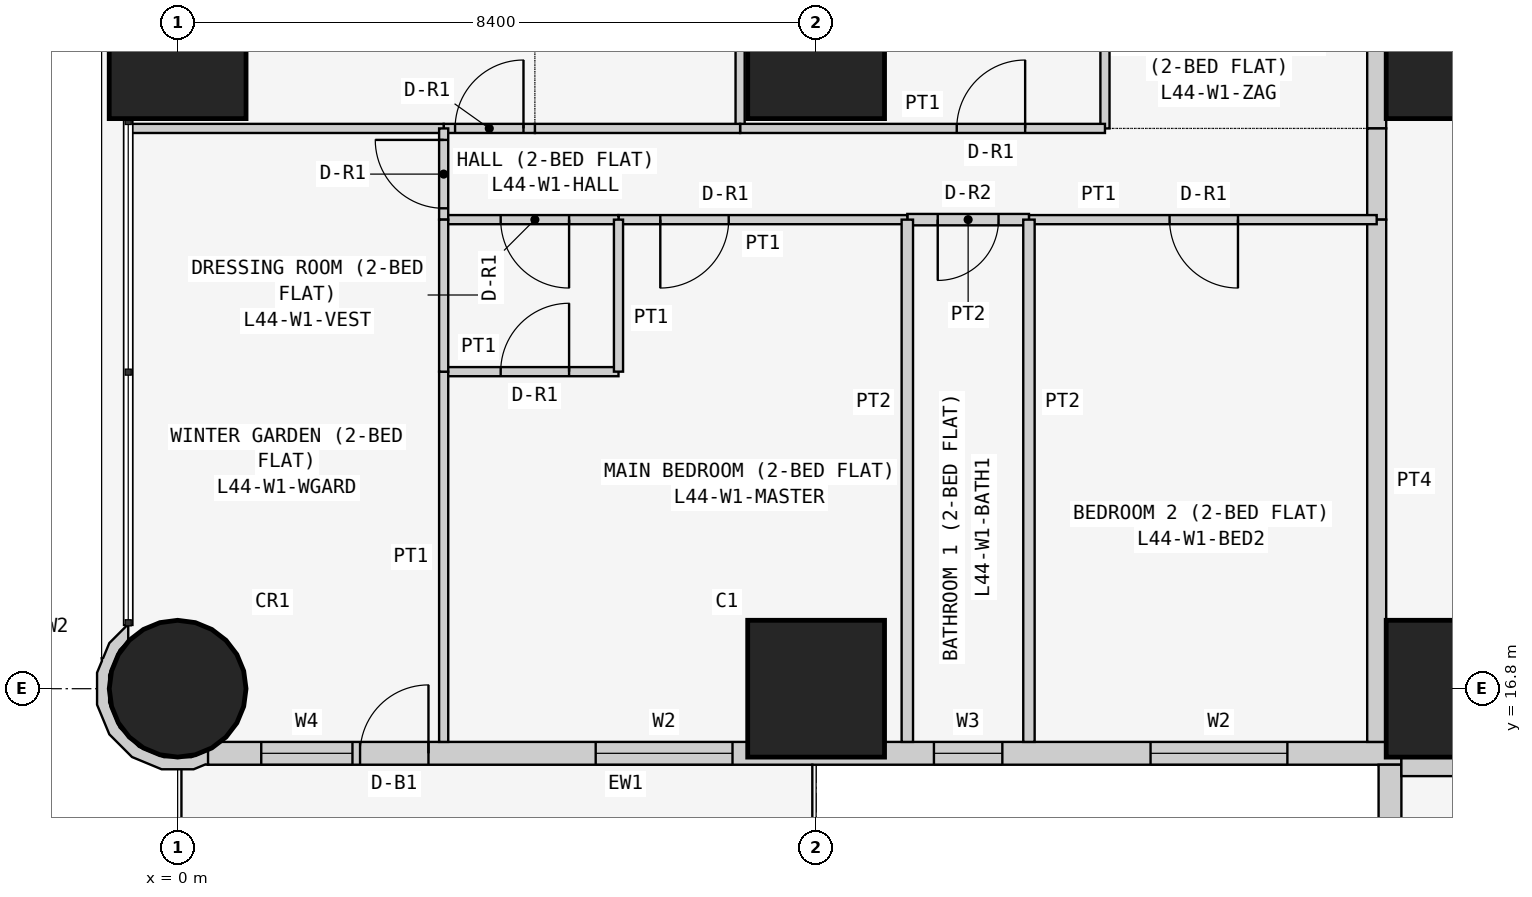
"""IFC4 building model, lengths in metres.
Left out: names, types, materials, properties, quantities, classifications, styles, units other than length and angle.
Written with IfcOpenShell. Run it as: python <this file> out.ifc"""

import sys

from ifc_helpers import new_model, si_unit, direction, frame, frame_2d, origin, origin_2d, place, context, subcontext, project, spatial, polyline, rectangle, circle, outline, extrude, element, fill, save


model = new_model("IFC4")
c1 = context("Model", 3, precision=1e-05, world=origin(), true_north=direction((0.0, 1.0)))
c2 = subcontext(c1, "Body", "Model", "MODEL_VIEW")
j1 = project(units=[si_unit("LENGTHUNIT", "METRE"), si_unit("PLANEANGLEUNIT", "RADIAN")], contexts=[c1])
p1 = place(None, origin())
s1 = spatial("IfcSite", under=j1, at=p1, CompositionType="ELEMENT")
p2 = place(p1, origin())
s2 = spatial("IfcBuilding", under=s1, at=p2, CompositionType="ELEMENT")
p3 = place(p2, frame((0.0, 0.0, 170.1)))
s3 = spatial("IfcBuildingStorey", under=s2, at=p3, CompositionType="ELEMENT", Elevation=170.1)
p4 = place(p3, frame((0.0, 16.8, 0.0), z_axis=(0.0, 0.0, 1.0), x_axis=(1.0, 0.0, 0.0)))
e1 = element("IfcColumn", 1, at=p4, inside=s3, PredefinedType="COLUMN", context=c2, shape_type="SweptSolid", body=[
    extrude(circle(Radius=0.9, at=origin_2d()), origin(), (0.0, 0.0, 1.0), 3.6),
])
for number, where, z_axis, x_axis in (
    (2, (0.0, 25.2, 0.0), (0.0, 0.0, 1.0), (1.0, 0.0, 0.0)),
    (3, (8.4, 16.8, 0.0), (0.0, 0.0, 1.0), (1.0, 0.0, 0.0)),
    (4, (8.4, 25.2, 0.0), (0.0, 0.0, 1.0), (1.0, 0.0, 0.0)),
    (5, (16.8, 16.8, 0.0), (0.0, 0.0, 1.0), (1.0, 0.0, 0.0)),
    (6, (16.8, 25.2, 0.0), (0.0, 0.0, 1.0), (1.0, 0.0, 0.0)),
):
    element("IfcColumn", number, at=place(p3, frame(where, z_axis=z_axis, x_axis=x_axis)), inside=s3, PredefinedType="COLUMN", context=c2, shape_type="SweptSolid", body=[
        extrude(rectangle(XDim=1.8, YDim=1.8, at=origin_2d()), origin(), (0.0, 0.0, 1.0), 3.6),
    ])
p5 = place(p3, frame((0.4, 15.95, 0.0), z_axis=(0.0, 0.0, 1.0), x_axis=(1.0, 0.0, 0.0)))
e7 = element("IfcWall", 7, at=p5, inside=s3, PredefinedType="SOLIDWALL", context=c2, shape_type="SweptSolid", body=[
    extrude(rectangle(XDim=15.7, YDim=0.3, at=frame_2d((7.85, 0.0))), origin(), (0.0, 0.0, 1.0), 3.45),
])
p6 = place(p5, frame((12.4, 0.0, 0.9)))
e8 = element("IfcOpeningElement", 8, at=p6, cuts=e7, PredefinedType="OPENING", context=c2, shape_type="SweptSolid", body=[
    extrude(rectangle(XDim=1.8, YDim=1.5, at=frame_2d((0.9, 0.75))), frame((0.0, 0.16, 0.0), z_axis=(0.0, -1.0, 0.0), x_axis=(1.0, 0.0, 0.0)), (0.0, 0.0, 1.0), 0.32),
])
p7 = place(p5, frame((9.55, 0.0, 1.5)))
e9 = element("IfcOpeningElement", 9, at=p7, cuts=e7, PredefinedType="OPENING", context=c2, shape_type="SweptSolid", body=[
    extrude(rectangle(XDim=0.9, YDim=0.7, at=frame_2d((0.45, 0.35))), frame((0.0, 0.16, 0.0), z_axis=(0.0, -1.0, 0.0), x_axis=(1.0, 0.0, 0.0)), (0.0, 0.0, 1.0), 0.32),
])
p8 = place(p5, frame((5.1, 0.0, 0.9)))
e10 = element("IfcOpeningElement", 10, at=p8, cuts=e7, PredefinedType="OPENING", context=c2, shape_type="SweptSolid", body=[
    extrude(rectangle(XDim=1.8, YDim=1.5, at=frame_2d((0.9, 0.75))), frame((0.0, 0.16, 0.0), z_axis=(0.0, -1.0, 0.0), x_axis=(1.0, 0.0, 0.0)), (0.0, 0.0, 1.0), 0.32),
])
p9 = place(p5, frame((2.0, 0.0, 0.0)))
e11 = element("IfcOpeningElement", 11, at=p9, cuts=e7, PredefinedType="OPENING", context=c2, shape_type="SweptSolid", body=[
    extrude(rectangle(XDim=0.9, YDim=2.4, at=frame_2d((0.45, 1.2))), frame((0.0, 0.16, 0.0), z_axis=(0.0, -1.0, 0.0), x_axis=(1.0, 0.0, 0.0)), (0.0, 0.0, 1.0), 0.32),
])
p10 = place(p5, frame((0.7, 0.0, 0.9)))
e12 = element("IfcOpeningElement", 12, at=p10, cuts=e7, PredefinedType="OPENING", context=c2, shape_type="SweptSolid", body=[
    extrude(rectangle(XDim=1.2, YDim=1.5, at=frame_2d((0.6, 0.75))), frame((0.0, 0.16, 0.0), z_axis=(0.0, -1.0, 0.0), x_axis=(1.0, 0.0, 0.0)), (0.0, 0.0, 1.0), 0.32),
])
p11 = place(p3, frame((15.95, 15.8, 0.0), z_axis=(0.0, 0.0, 1.0), x_axis=(0.0, -1.0, 0.0)))
e13 = element("IfcWall", 13, at=p11, inside=s3, PredefinedType="SOLIDWALL", context=c2, shape_type="SweptSolid", body=[
    extrude(rectangle(XDim=7.0, YDim=0.3, at=frame_2d((3.5, 0.0))), origin(), (0.0, 0.0, 1.0), 3.45),
])
p12 = place(p11, frame((1.5, 0.0, 0.9)))
e14 = element("IfcOpeningElement", 14, at=p12, cuts=e13, PredefinedType="OPENING", context=c2, shape_type="SweptSolid", body=[
    extrude(rectangle(XDim=2.4, YDim=1.5, at=frame_2d((1.2, 0.75))), frame((0.0, 0.16, 0.0), z_axis=(0.0, -1.0, 0.0), x_axis=(1.0, 0.0, 0.0)), (0.0, 0.0, 1.0), 0.32),
])
p13 = place(p11, frame((5.05, 0.0, 0.9)))
e15 = element("IfcOpeningElement", 15, at=p13, cuts=e13, PredefinedType="OPENING", context=c2, shape_type="SweptSolid", body=[
    extrude(rectangle(XDim=1.2, YDim=1.5, at=frame_2d((0.6, 0.75))), frame((0.0, 0.16, 0.0), z_axis=(0.0, -1.0, 0.0), x_axis=(1.0, 0.0, 0.0)), (0.0, 0.0, 1.0), 0.32),
])
p14 = place(p3, frame((-0.611, 17.567, 0.0), z_axis=(0.0, 0.0, 1.0), x_axis=(-0.926129809145, -0.377204953059, 0.0)))
e16 = element("IfcWall", 16, at=p14, inside=s3, PredefinedType="SOLIDWALL", context=c2, shape_type="SweptSolid", body=[
    extrude(outline(polyline([(-0.269, 2.017), (-0.37, 1.841), (-0.102, 1.842), (0.23, 1.707), (0.485, 1.455), (0.624, 1.125), (0.626, 0.766), (0.49, 0.434), (0.239, 0.179), (0.09, 0.117), (0.011, -0.078), (0.024, -0.083), (0.33, 0.045), (0.48, 0.197), (0.499, 0.193), (0.508, 0.225), (0.626, 0.345), (0.785, 0.736), (0.782, 1.157), (0.619, 1.546), (0.319, 1.842), (-0.072, 2.001), (-0.24, 2.0), (-0.269, 2.017)])), origin(), (0.0, 0.0, 1.0), 3.45),
])
p15 = place(p3, frame((22.971, 15.775, 0.0), z_axis=(0.0, 0.0, 1.0), x_axis=(-1.0, 0.0, 0.0)))
e17 = element("IfcWall", 17, at=p15, inside=s3, PredefinedType="PARTITIONING", context=c2, shape_type="SweptSolid", body=[
    extrude(rectangle(XDim=6.871, YDim=0.25, at=frame_2d((3.436, 0.0))), origin(), (0.0, 0.0, 1.0), 3.45),
])
p16 = place(p3, frame((15.775, 24.171, 0.0), z_axis=(0.0, 0.0, 1.0), x_axis=(0.0, 1.0, 0.0)))
e18 = element("IfcWall", 18, at=p16, inside=s3, PredefinedType="PARTITIONING", context=c2, shape_type="SweptSolid", body=[
    extrude(rectangle(XDim=5.229, YDim=0.25, at=frame_2d((2.615, 0.0))), origin(), (0.0, 0.0, 1.0), 3.45),
])
p17 = place(p16, frame((2.129, 0.0, 0.0)))
e19 = element("IfcOpeningElement", 19, at=p17, cuts=e18, PredefinedType="OPENING", context=c2, shape_type="SweptSolid", body=[
    extrude(rectangle(XDim=1.0, YDim=2.1, at=frame_2d((0.5, 1.05))), frame((0.0, 0.135, 0.0), z_axis=(0.0, -1.0, 0.0), x_axis=(1.0, 0.0, 0.0)), (0.0, 0.0, 1.0), 0.27),
])
p18 = place(p3, frame((15.775, 22.971, 0.0), z_axis=(0.0, 0.0, 1.0), x_axis=(0.0, 1.0, 0.0)))
e20 = element("IfcWall", 20, at=p18, inside=s3, PredefinedType="PARTITIONING", context=c2, shape_type="SweptSolid", body=[
    extrude(rectangle(XDim=1.2, YDim=0.25, at=frame_2d((0.6, 0.0))), origin(), (0.0, 0.0, 1.0), 3.45),
])
p19 = place(p3, frame((15.775, 16.1, 0.0), z_axis=(0.0, 0.0, 1.0), x_axis=(0.0, 1.0, 0.0)))
e21 = element("IfcWall", 21, at=p19, inside=s3, PredefinedType="PARTITIONING", context=c2, shape_type="SweptSolid", body=[
    extrude(rectangle(XDim=6.871, YDim=0.25, at=frame_2d((3.436, 0.0))), origin(), (0.0, 0.0, 1.0), 3.45),
])
for number, where, z_axis, x_axis in (
    (22, (12.2, 29.4, 0.0), (0.0, 0.0, 1.0), (0.0, -1.0, 0.0)),
    (23, (7.4, 29.4, 0.0), (0.0, 0.0, 1.0), (0.0, -1.0, 0.0)),
):
    element("IfcWall", number, at=place(p3, frame(where, z_axis=z_axis, x_axis=x_axis)), inside=s3, PredefinedType="PARTITIONING", context=c2, shape_type="SweptSolid", body=[
        extrude(rectangle(XDim=5.229, YDim=0.12, at=frame_2d((2.615, 0.0))), origin(), (0.0, 0.0, 1.0), 3.45),
    ])
p20 = place(p3, frame((7.4, 24.171, 0.0), z_axis=(0.0, 0.0, 1.0), x_axis=(1.0, 0.0, 0.0)))
e24 = element("IfcWall", 24, at=p20, inside=s3, PredefinedType="PARTITIONING", context=c2, shape_type="SweptSolid", body=[
    extrude(rectangle(XDim=4.8, YDim=0.12, at=frame_2d((2.4, 0.0))), origin(), (0.0, 0.0, 1.0), 3.45),
])
p21 = place(p20, frame((2.85, 0.0, 0.0)))
e25 = element("IfcOpeningElement", 25, at=p21, cuts=e24, PredefinedType="OPENING", context=c2, shape_type="SweptSolid", body=[
    extrude(rectangle(XDim=0.9, YDim=2.1, at=frame_2d((0.45, 1.05))), frame((0.0, 0.07, 0.0), z_axis=(0.0, -1.0, 0.0), x_axis=(1.0, 0.0, 0.0)), (0.0, 0.0, 1.0), 0.14),
])
p22 = place(p3, frame((4.7, 24.171, 0.0), z_axis=(0.0, 0.0, 1.0), x_axis=(1.0, 0.0, 0.0)))
e26 = element("IfcWall", 26, at=p22, inside=s3, PredefinedType="PARTITIONING", context=c2, shape_type="SweptSolid", body=[
    extrude(rectangle(XDim=2.7, YDim=0.12, at=frame_2d((1.35, 0.0))), origin(), (0.0, 0.0, 1.0), 3.45),
])
p23 = place(p3, frame((3.5, 24.171, 0.0), z_axis=(0.0, 0.0, 1.0), x_axis=(1.0, 0.0, 0.0)))
e27 = element("IfcWall", 27, at=p23, inside=s3, PredefinedType="PARTITIONING", context=c2, shape_type="SweptSolid", body=[
    extrude(rectangle(XDim=1.2, YDim=0.12, at=frame_2d((0.6, 0.0))), origin(), (0.0, 0.0, 1.0), 3.45),
])
p24 = place(p23, frame((0.15, 0.0, 0.0)))
e28 = element("IfcOpeningElement", 28, at=p24, cuts=e27, PredefinedType="OPENING", context=c2, shape_type="SweptSolid", body=[
    extrude(rectangle(XDim=0.9, YDim=2.1, at=frame_2d((0.45, 1.05))), frame((0.0, 0.07, 0.0), z_axis=(0.0, -1.0, 0.0), x_axis=(1.0, 0.0, 0.0)), (0.0, 0.0, 1.0), 0.14),
])
p25 = place(p3, frame((-0.65, 24.171, 0.0), z_axis=(0.0, 0.0, 1.0), x_axis=(1.0, 0.0, 0.0)))
e29 = element("IfcWall", 29, at=p25, inside=s3, PredefinedType="PARTITIONING", context=c2, shape_type="SweptSolid", body=[
    extrude(rectangle(XDim=4.15, YDim=0.12, at=frame_2d((2.075, 0.0))), origin(), (0.0, 0.0, 1.0), 3.45),
])
p26 = place(p3, frame((11.2, 22.971, 0.0), z_axis=(0.0, 0.0, 1.0), x_axis=(1.0, 0.0, 0.0)))
e30 = element("IfcWall", 30, at=p26, inside=s3, PredefinedType="PARTITIONING", context=c2, shape_type="SweptSolid", body=[
    extrude(rectangle(XDim=4.575, YDim=0.12, at=frame_2d((2.288, 0.0))), origin(), (0.0, 0.0, 1.0), 3.45),
])
p27 = place(p26, frame((1.85, 0.0, 0.0)))
e31 = element("IfcOpeningElement", 31, at=p27, cuts=e30, PredefinedType="OPENING", context=c2, shape_type="SweptSolid", body=[
    extrude(rectangle(XDim=0.9, YDim=2.1, at=frame_2d((0.45, 1.05))), frame((0.0, 0.07, 0.0), z_axis=(0.0, -1.0, 0.0), x_axis=(1.0, 0.0, 0.0)), (0.0, 0.0, 1.0), 0.14),
])
p28 = place(p3, frame((9.6, 22.971, 0.0), z_axis=(0.0, 0.0, 1.0), x_axis=(1.0, 0.0, 0.0)))
e32 = element("IfcWall", 32, at=p28, inside=s3, PredefinedType="PARTITIONING", context=c2, shape_type="SweptSolid", body=[
    extrude(rectangle(XDim=1.6, YDim=0.15, at=frame_2d((0.8, 0.0))), origin(), (0.0, 0.0, 1.0), 3.45),
])
p29 = place(p28, frame((0.4, 0.0, 0.0)))
e33 = element("IfcOpeningElement", 33, at=p29, cuts=e32, PredefinedType="OPENING", context=c2, shape_type="SweptSolid", body=[
    extrude(rectangle(XDim=0.8, YDim=2.1, at=frame_2d((0.4, 1.05))), frame((0.0, 0.085, 0.0), z_axis=(0.0, -1.0, 0.0), x_axis=(1.0, 0.0, 0.0)), (0.0, 0.0, 1.0), 0.17),
])
p30 = place(p3, frame((5.8, 22.971, 0.0), z_axis=(0.0, 0.0, 1.0), x_axis=(1.0, 0.0, 0.0)))
e34 = element("IfcWall", 34, at=p30, inside=s3, PredefinedType="PARTITIONING", context=c2, shape_type="SweptSolid", body=[
    extrude(rectangle(XDim=3.8, YDim=0.12, at=frame_2d((1.9, 0.0))), origin(), (0.0, 0.0, 1.0), 3.45),
])
p31 = place(p30, frame((0.55, 0.0, 0.0)))
e35 = element("IfcOpeningElement", 35, at=p31, cuts=e34, PredefinedType="OPENING", context=c2, shape_type="SweptSolid", body=[
    extrude(rectangle(XDim=0.9, YDim=2.1, at=frame_2d((0.45, 1.05))), frame((0.0, 0.07, 0.0), z_axis=(0.0, -1.0, 0.0), x_axis=(1.0, 0.0, 0.0)), (0.0, 0.0, 1.0), 0.14),
])
p32 = place(p3, frame((3.5, 22.971, 0.0), z_axis=(0.0, 0.0, 1.0), x_axis=(1.0, 0.0, 0.0)))
e36 = element("IfcWall", 36, at=p32, inside=s3, PredefinedType="PARTITIONING", context=c2, shape_type="SweptSolid", body=[
    extrude(rectangle(XDim=2.3, YDim=0.12, at=frame_2d((1.15, 0.0))), origin(), (0.0, 0.0, 1.0), 3.45),
])
p33 = place(p32, frame((0.75, 0.0, 0.0)))
e37 = element("IfcOpeningElement", 37, at=p33, cuts=e36, PredefinedType="OPENING", context=c2, shape_type="SweptSolid", body=[
    extrude(rectangle(XDim=0.9, YDim=2.1, at=frame_2d((0.45, 1.05))), frame((0.0, 0.07, 0.0), z_axis=(0.0, -1.0, 0.0), x_axis=(1.0, 0.0, 0.0)), (0.0, 0.0, 1.0), 0.14),
])
p34 = place(p3, frame((3.5, 24.171, 0.0), z_axis=(0.0, 0.0, 1.0), x_axis=(0.0, -1.0, 0.0)))
e38 = element("IfcWall", 38, at=p34, inside=s3, PredefinedType="PARTITIONING", context=c2, shape_type="SweptSolid", body=[
    extrude(rectangle(XDim=1.2, YDim=0.12, at=frame_2d((0.6, 0.0))), origin(), (0.0, 0.0, 1.0), 3.45),
])
p35 = place(p34, frame((0.151, 0.0, 0.0)))
e39 = element("IfcOpeningElement", 39, at=p35, cuts=e38, PredefinedType="OPENING", context=c2, shape_type="SweptSolid", body=[
    extrude(rectangle(XDim=0.9, YDim=2.1, at=frame_2d((0.45, 1.05))), frame((0.0, 0.07, 0.0), z_axis=(0.0, -1.0, 0.0), x_axis=(1.0, 0.0, 0.0)), (0.0, 0.0, 1.0), 0.14),
])
for number, where, z_axis, x_axis in (
    (40, (11.2, 22.971, 0.0), (0.0, 0.0, 1.0), (0.0, -1.0, 0.0)),
    (41, (9.6, 22.971, 0.0), (0.0, 0.0, 1.0), (0.0, -1.0, 0.0)),
):
    element("IfcWall", number, at=place(p3, frame(where, z_axis=z_axis, x_axis=x_axis)), inside=s3, PredefinedType="PARTITIONING", context=c2, shape_type="SweptSolid", body=[
        extrude(rectangle(XDim=6.871, YDim=0.15, at=frame_2d((3.436, 0.0))), origin(), (0.0, 0.0, 1.0), 3.45),
    ])
p36 = place(p3, frame((3.5, 20.971, 0.0), z_axis=(0.0, 0.0, 1.0), x_axis=(1.0, 0.0, 0.0)))
e42 = element("IfcWall", 42, at=p36, inside=s3, PredefinedType="PARTITIONING", context=c2, shape_type="SweptSolid", body=[
    extrude(rectangle(XDim=2.3, YDim=0.12, at=frame_2d((1.15, 0.0))), origin(), (0.0, 0.0, 1.0), 3.45),
])
p37 = place(p36, frame((0.75, 0.0, 0.0)))
e43 = element("IfcOpeningElement", 43, at=p37, cuts=e42, PredefinedType="OPENING", context=c2, shape_type="SweptSolid", body=[
    extrude(rectangle(XDim=0.9, YDim=2.1, at=frame_2d((0.45, 1.05))), frame((0.0, 0.07, 0.0), z_axis=(0.0, -1.0, 0.0), x_axis=(1.0, 0.0, 0.0)), (0.0, 0.0, 1.0), 0.14),
])
p38 = place(p3, frame((5.8, 20.971, 0.0), z_axis=(0.0, 0.0, 1.0), x_axis=(0.0, 1.0, 0.0)))
e44 = element("IfcWall", 44, at=p38, inside=s3, PredefinedType="PARTITIONING", context=c2, shape_type="SweptSolid", body=[
    extrude(rectangle(XDim=2.0, YDim=0.12, at=frame_2d((1.0, 0.0))), origin(), (0.0, 0.0, 1.0), 3.45),
])
p39 = place(p3, frame((3.5, 16.1, 0.0), z_axis=(0.0, 0.0, 1.0), x_axis=(0.0, 1.0, 0.0)))
e45 = element("IfcWall", 45, at=p39, inside=s3, PredefinedType="PARTITIONING", context=c2, shape_type="SweptSolid", body=[
    extrude(rectangle(XDim=4.871, YDim=0.12, at=frame_2d((2.436, 0.0))), origin(), (0.0, 0.0, 1.0), 3.45),
])
p40 = place(p3, frame((3.5, 22.971, 0.0), z_axis=(0.0, 0.0, 1.0), x_axis=(0.0, -1.0, 0.0)))
e46 = element("IfcWall", 46, at=p40, inside=s3, PredefinedType="PARTITIONING", context=c2, shape_type="SweptSolid", body=[
    extrude(rectangle(XDim=2.0, YDim=0.12, at=frame_2d((1.0, 0.0))), origin(), (0.0, 0.0, 1.0), 3.45),
])
p41 = place(p6, origin())
e47 = element("IfcWindow", 47, at=p41, inside=s3, PartitioningType="SINGLE_PANEL", PredefinedType="WINDOW", context=c2, shape_type="SweptSolid", body=[
    extrude(rectangle(XDim=1.8, YDim=1.5, at=frame_2d((0.9, 0.75))), frame((0.0, 0.03, 0.0), z_axis=(0.0, -1.0, 0.0), x_axis=(1.0, 0.0, 0.0)), (0.0, 0.0, 1.0), 0.06),
])
fill(e8, e47)
p42 = place(p7, origin())
e48 = element("IfcWindow", 48, at=p42, inside=s3, PartitioningType="SINGLE_PANEL", PredefinedType="WINDOW", context=c2, shape_type="SweptSolid", body=[
    extrude(rectangle(XDim=0.9, YDim=0.7, at=frame_2d((0.45, 0.35))), frame((0.0, 0.03, 0.0), z_axis=(0.0, -1.0, 0.0), x_axis=(1.0, 0.0, 0.0)), (0.0, 0.0, 1.0), 0.06),
])
fill(e9, e48)
p43 = place(p8, origin())
e49 = element("IfcWindow", 49, at=p43, inside=s3, PartitioningType="SINGLE_PANEL", PredefinedType="WINDOW", context=c2, shape_type="SweptSolid", body=[
    extrude(rectangle(XDim=1.8, YDim=1.5, at=frame_2d((0.9, 0.75))), frame((0.0, 0.03, 0.0), z_axis=(0.0, -1.0, 0.0), x_axis=(1.0, 0.0, 0.0)), (0.0, 0.0, 1.0), 0.06),
])
fill(e10, e49)
p44 = place(p9, origin())
e50 = element("IfcDoor", 50, at=p44, inside=s3, OperationType="SINGLE_SWING_RIGHT", PredefinedType="DOOR", context=c2, shape_type="SweptSolid", body=[
    extrude(rectangle(XDim=0.9, YDim=2.4, at=frame_2d((0.45, 1.2))), frame((0.0, 0.025, 0.0), z_axis=(0.0, -1.0, 0.0), x_axis=(1.0, 0.0, 0.0)), (0.0, 0.0, 1.0), 0.05),
])
fill(e11, e50)
p45 = place(p10, origin())
e51 = element("IfcWindow", 51, at=p45, inside=s3, PartitioningType="SINGLE_PANEL", PredefinedType="WINDOW", context=c2, shape_type="SweptSolid", body=[
    extrude(rectangle(XDim=1.2, YDim=1.5, at=frame_2d((0.6, 0.75))), frame((0.0, 0.03, 0.0), z_axis=(0.0, -1.0, 0.0), x_axis=(1.0, 0.0, 0.0)), (0.0, 0.0, 1.0), 0.06),
])
fill(e12, e51)
p46 = place(p21, origin())
e52 = element("IfcDoor", 52, at=p46, inside=s3, OperationType="SINGLE_SWING_RIGHT", PredefinedType="DOOR", context=c2, shape_type="SweptSolid", body=[
    extrude(rectangle(XDim=0.9, YDim=2.1, at=frame_2d((0.45, 1.05))), frame((0.0, 0.025, 0.0), z_axis=(0.0, -1.0, 0.0), x_axis=(1.0, 0.0, 0.0)), (0.0, 0.0, 1.0), 0.05),
])
fill(e25, e52)
p47 = place(p24, origin())
e53 = element("IfcDoor", 53, at=p47, inside=s3, OperationType="SINGLE_SWING_RIGHT", PredefinedType="DOOR", context=c2, shape_type="SweptSolid", body=[
    extrude(rectangle(XDim=0.9, YDim=2.1, at=frame_2d((0.45, 1.05))), frame((0.0, 0.025, 0.0), z_axis=(0.0, -1.0, 0.0), x_axis=(1.0, 0.0, 0.0)), (0.0, 0.0, 1.0), 0.05),
])
fill(e28, e53)
p48 = place(p27, frame((0.9, 0.0, 0.0), z_axis=(0.0, 0.0, 1.0), x_axis=(-1.0, 0.0, 0.0)))
e54 = element("IfcDoor", 54, at=p48, inside=s3, OperationType="SINGLE_SWING_LEFT", PredefinedType="DOOR", context=c2, shape_type="SweptSolid", body=[
    extrude(rectangle(XDim=0.9, YDim=2.1, at=frame_2d((0.45, 1.05))), frame((0.0, 0.025, 0.0), z_axis=(0.0, -1.0, 0.0), x_axis=(1.0, 0.0, 0.0)), (0.0, 0.0, 1.0), 0.05),
])
fill(e31, e54)
p49 = place(p29, frame((0.8, 0.0, 0.0), z_axis=(0.0, 0.0, 1.0), x_axis=(-1.0, 0.0, 0.0)))
e55 = element("IfcDoor", 55, at=p49, inside=s3, OperationType="SINGLE_SWING_RIGHT", PredefinedType="DOOR", context=c2, shape_type="SweptSolid", body=[
    extrude(rectangle(XDim=0.8, YDim=2.1, at=frame_2d((0.4, 1.05))), frame((0.0, 0.025, 0.0), z_axis=(0.0, -1.0, 0.0), x_axis=(1.0, 0.0, 0.0)), (0.0, 0.0, 1.0), 0.05),
])
fill(e33, e55)
p50 = place(p31, frame((0.9, 0.0, 0.0), z_axis=(0.0, 0.0, 1.0), x_axis=(-1.0, 0.0, 0.0)))
e56 = element("IfcDoor", 56, at=p50, inside=s3, OperationType="SINGLE_SWING_RIGHT", PredefinedType="DOOR", context=c2, shape_type="SweptSolid", body=[
    extrude(rectangle(XDim=0.9, YDim=2.1, at=frame_2d((0.45, 1.05))), frame((0.0, 0.025, 0.0), z_axis=(0.0, -1.0, 0.0), x_axis=(1.0, 0.0, 0.0)), (0.0, 0.0, 1.0), 0.05),
])
fill(e35, e56)
p51 = place(p33, frame((0.9, 0.0, 0.0), z_axis=(0.0, 0.0, 1.0), x_axis=(-1.0, 0.0, 0.0)))
e57 = element("IfcDoor", 57, at=p51, inside=s3, OperationType="SINGLE_SWING_LEFT", PredefinedType="DOOR", context=c2, shape_type="SweptSolid", body=[
    extrude(rectangle(XDim=0.9, YDim=2.1, at=frame_2d((0.45, 1.05))), frame((0.0, 0.025, 0.0), z_axis=(0.0, -1.0, 0.0), x_axis=(1.0, 0.0, 0.0)), (0.0, 0.0, 1.0), 0.05),
])
fill(e37, e57)
p52 = place(p37, origin())
e58 = element("IfcDoor", 58, at=p52, inside=s3, OperationType="SINGLE_SWING_RIGHT", PredefinedType="DOOR", context=c2, shape_type="SweptSolid", body=[
    extrude(rectangle(XDim=0.9, YDim=2.1, at=frame_2d((0.45, 1.05))), frame((0.0, 0.025, 0.0), z_axis=(0.0, -1.0, 0.0), x_axis=(1.0, 0.0, 0.0)), (0.0, 0.0, 1.0), 0.05),
])
fill(e43, e58)
p53 = place(p35, frame((0.9, 0.0, 0.0), z_axis=(0.0, 0.0, 1.0), x_axis=(-1.0, 0.0, 0.0)))
e59 = element("IfcDoor", 59, at=p53, inside=s3, OperationType="SINGLE_SWING_RIGHT", PredefinedType="DOOR", context=c2, shape_type="SweptSolid", body=[
    extrude(rectangle(XDim=0.9, YDim=2.1, at=frame_2d((0.45, 1.05))), frame((0.0, 0.025, 0.0), z_axis=(0.0, -1.0, 0.0), x_axis=(1.0, 0.0, 0.0)), (0.0, 0.0, 1.0), 0.05),
])
fill(e39, e59)
save(model, sys.argv[1])
